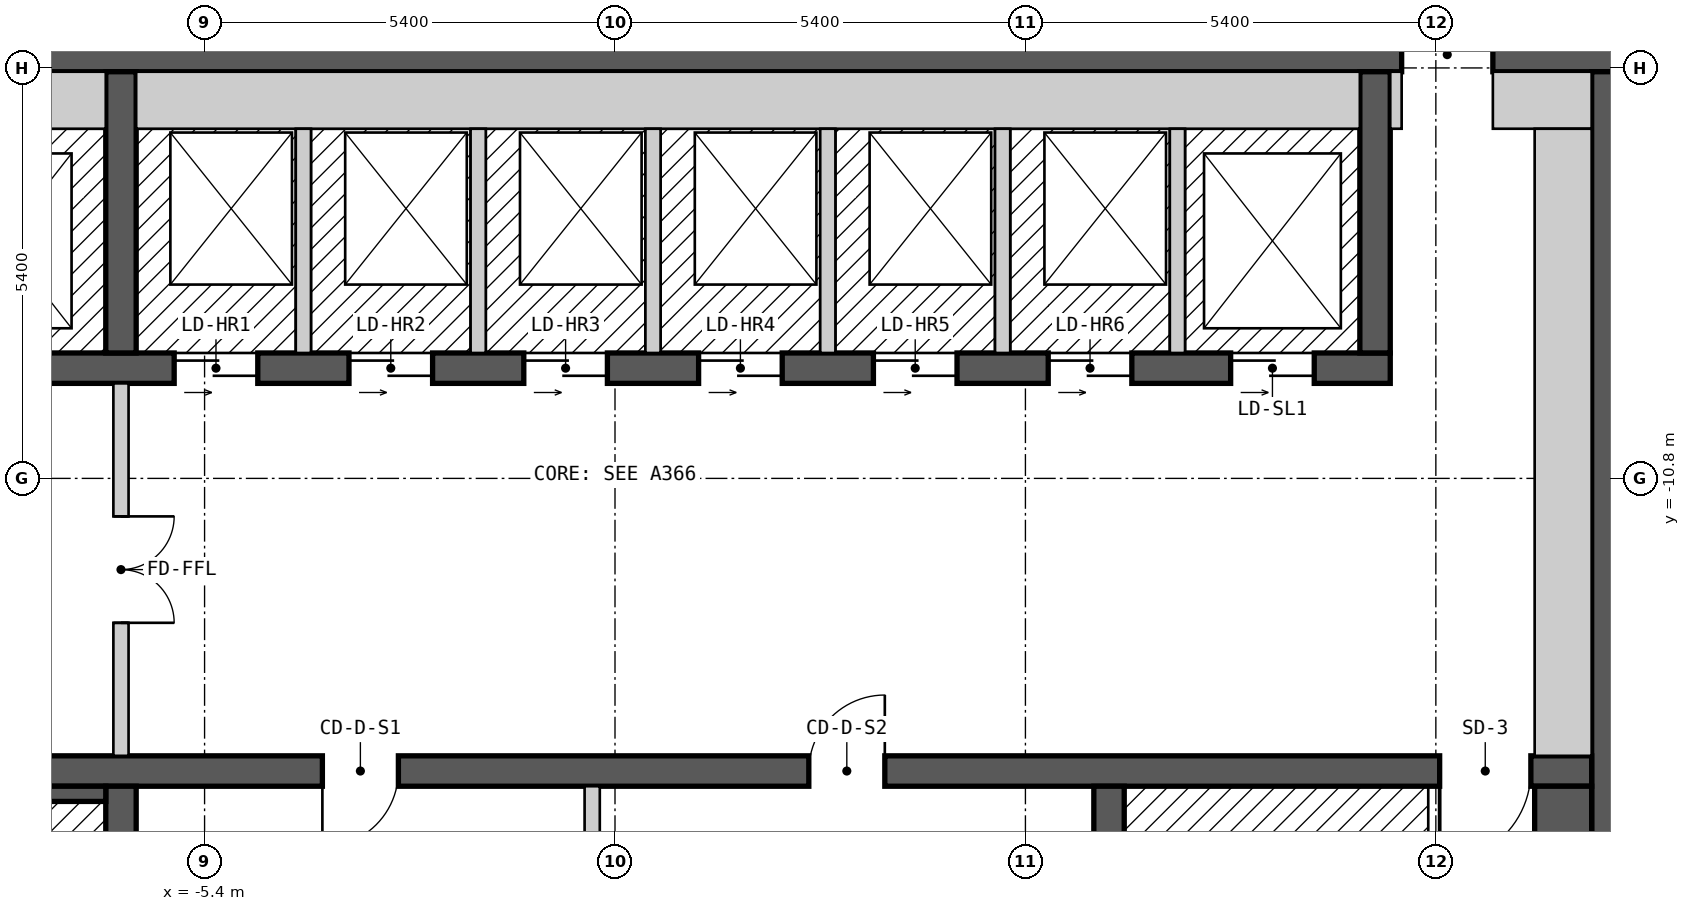
"""IFC4 building model, lengths in metres.
Left out: names, types, materials, properties, quantities, classifications, styles, units other than length and angle.
Written with IfcOpenShell. Run it as: python <this file> out.ifc"""

import sys

from ifc_helpers import new_model, si_unit, direction, frame, frame_2d, origin, place, context, subcontext, project, spatial, rectangle, extrude, element, fill, save


model = new_model("IFC4")
c1 = context("Model", 3, precision=1e-05, world=origin(), true_north=direction((0.0, 1.0)))
c2 = subcontext(c1, "Body", "Model", "MODEL_VIEW")
j1 = project(units=[si_unit("LENGTHUNIT", "METRE"), si_unit("PLANEANGLEUNIT", "RADIAN")], contexts=[c1])
p1 = place(None, origin())
s1 = spatial("IfcSite", under=j1, at=p1, CompositionType="ELEMENT")
p2 = place(p1, origin())
s2 = spatial("IfcBuilding", under=s1, at=p2, CompositionType="ELEMENT")
p3 = place(p2, frame((0.0, 0.0, 241.8)))
s3 = spatial("IfcBuildingStorey", under=s2, at=p3, CompositionType="ELEMENT", Elevation=241.8)
p4 = place(p3, frame((-13.3, -5.225, 0.0), z_axis=(0.0, 0.0, 1.0), x_axis=(1.0, 0.0, 0.0)))
e1 = element("IfcWall", 1, at=p4, inside=s3, PredefinedType="SHEAR", context=c2, shape_type="SweptSolid", body=[
    extrude(rectangle(XDim=26.6, YDim=0.45, at=frame_2d((13.3, 0.0))), origin(), (0.0, 0.0, 1.0), 2.2),
])
p5 = place(p4, frame((23.65, 0.0, 0.0)))
e2 = element("IfcOpeningElement", 2, at=p5, cuts=e1, PredefinedType="OPENING", context=c2, shape_type="SweptSolid", body=[
    extrude(rectangle(XDim=1.2, YDim=2.1, at=frame_2d((0.6, 1.05))), frame((0.0, 0.235, 0.0), z_axis=(0.0, -1.0, 0.0), x_axis=(1.0, 0.0, 0.0)), (0.0, 0.0, 1.0), 0.47),
])
p6 = place(p3, frame((13.075, -18.55, 0.0), z_axis=(0.0, 0.0, 1.0), x_axis=(0.0, 1.0, 0.0)))
e3 = element("IfcWall", 3, at=p6, inside=s3, PredefinedType="SHEAR", context=c2, shape_type="SweptSolid", body=[
    extrude(rectangle(XDim=13.1, YDim=0.45, at=frame_2d((6.55, 0.0))), origin(), (0.0, 0.0, 1.0), 2.2),
])
p7 = place(p3, frame((-12.85, -14.65, 0.0), z_axis=(0.0, 0.0, 1.0), x_axis=(1.0, 0.0, 0.0)))
e4 = element("IfcWall", 4, at=p7, inside=s3, PredefinedType="SHEAR", context=c2, shape_type="SweptSolid", body=[
    extrude(rectangle(XDim=25.7, YDim=0.4, at=frame_2d((12.85, 0.0))), origin(), (0.0, 0.0, 1.0), 2.2),
])
p8 = place(p7, frame((2.05, 0.0, 0.0), z_axis=(0.0, 0.0, 1.0), x_axis=(-1.0, 0.0, 0.0)))
e5 = element("IfcOpeningElement", 5, at=p8, cuts=e4, PredefinedType="OPENING", context=c2, shape_type="SweptSolid", body=[
    extrude(rectangle(XDim=1.2, YDim=2.1, at=frame_2d((0.6, 1.05))), frame((0.0, 0.21, 0.0), z_axis=(0.0, -1.0, 0.0), x_axis=(1.0, 0.0, 0.0)), (0.0, 0.0, 1.0), 0.42),
])
p9 = place(p7, frame((24.9, 0.0, 0.0), z_axis=(0.0, 0.0, 1.0), x_axis=(-1.0, 0.0, 0.0)))
e6 = element("IfcOpeningElement", 6, at=p9, cuts=e4, PredefinedType="OPENING", context=c2, shape_type="SweptSolid", body=[
    extrude(rectangle(XDim=1.2, YDim=2.1, at=frame_2d((0.6, 1.05))), frame((0.0, 0.21, 0.0), z_axis=(0.0, -1.0, 0.0), x_axis=(1.0, 0.0, 0.0)), (0.0, 0.0, 1.0), 0.42),
])
p10 = place(p7, frame((10.0, 0.0, 0.0), z_axis=(0.0, 0.0, 1.0), x_axis=(-1.0, 0.0, 0.0)))
e7 = element("IfcOpeningElement", 7, at=p10, cuts=e4, PredefinedType="OPENING", context=c2, shape_type="SweptSolid", body=[
    extrude(rectangle(XDim=1.0, YDim=2.1, at=frame_2d((0.5, 1.05))), frame((0.0, 0.21, 0.0), z_axis=(0.0, -1.0, 0.0), x_axis=(1.0, 0.0, 0.0)), (0.0, 0.0, 1.0), 0.42),
])
p11 = place(p7, frame((16.4, 0.0, 0.0), z_axis=(0.0, 0.0, 1.0), x_axis=(-1.0, 0.0, 0.0)))
e8 = element("IfcOpeningElement", 8, at=p11, cuts=e4, PredefinedType="OPENING", context=c2, shape_type="SweptSolid", body=[
    extrude(rectangle(XDim=1.0, YDim=2.1, at=frame_2d((0.5, 1.05))), frame((0.0, 0.21, 0.0), z_axis=(0.0, -1.0, 0.0), x_axis=(1.0, 0.0, 0.0)), (0.0, 0.0, 1.0), 0.42),
])
p12 = place(p3, frame((-12.85, -9.35, 0.0), z_axis=(0.0, 0.0, 1.0), x_axis=(1.0, 0.0, 0.0)))
e9 = element("IfcWall", 9, at=p12, inside=s3, PredefinedType="SHEAR", context=c2, shape_type="SweptSolid", body=[
    extrude(rectangle(XDim=23.05, YDim=0.4, at=frame_2d((11.525, 0.0))), origin(), (0.0, 0.0, 1.0), 2.2),
])
p13 = place(p12, frame((1.45, 0.0, 0.0)))
e10 = element("IfcOpeningElement", 10, at=p13, cuts=e9, PredefinedType="OPENING", context=c2, shape_type="SweptSolid", body=[
    extrude(rectangle(XDim=1.1, YDim=2.1, at=frame_2d((0.55, 1.05))), frame((0.0, 0.21, 0.0), z_axis=(0.0, -1.0, 0.0), x_axis=(1.0, 0.0, 0.0)), (0.0, 0.0, 1.0), 0.42),
])
p14 = place(p12, frame((4.25, 0.0, 0.0)))
e11 = element("IfcOpeningElement", 11, at=p14, cuts=e9, PredefinedType="OPENING", context=c2, shape_type="SweptSolid", body=[
    extrude(rectangle(XDim=1.1, YDim=2.1, at=frame_2d((0.55, 1.05))), frame((0.0, 0.21, 0.0), z_axis=(0.0, -1.0, 0.0), x_axis=(1.0, 0.0, 0.0)), (0.0, 0.0, 1.0), 0.42),
])
p15 = place(p12, frame((7.05, 0.0, 0.0)))
e12 = element("IfcOpeningElement", 12, at=p15, cuts=e9, PredefinedType="OPENING", context=c2, shape_type="SweptSolid", body=[
    extrude(rectangle(XDim=1.1, YDim=2.1, at=frame_2d((0.55, 1.05))), frame((0.0, 0.21, 0.0), z_axis=(0.0, -1.0, 0.0), x_axis=(1.0, 0.0, 0.0)), (0.0, 0.0, 1.0), 0.42),
])
p16 = place(p12, frame((9.35, 0.0, 0.0)))
e13 = element("IfcOpeningElement", 13, at=p16, cuts=e9, PredefinedType="OPENING", context=c2, shape_type="SweptSolid", body=[
    extrude(rectangle(XDim=1.1, YDim=2.1, at=frame_2d((0.55, 1.05))), frame((0.0, 0.21, 0.0), z_axis=(0.0, -1.0, 0.0), x_axis=(1.0, 0.0, 0.0)), (0.0, 0.0, 1.0), 0.42),
])
p17 = place(p12, frame((11.65, 0.0, 0.0)))
e14 = element("IfcOpeningElement", 14, at=p17, cuts=e9, PredefinedType="OPENING", context=c2, shape_type="SweptSolid", body=[
    extrude(rectangle(XDim=1.1, YDim=2.1, at=frame_2d((0.55, 1.05))), frame((0.0, 0.21, 0.0), z_axis=(0.0, -1.0, 0.0), x_axis=(1.0, 0.0, 0.0)), (0.0, 0.0, 1.0), 0.42),
])
p18 = place(p12, frame((13.95, 0.0, 0.0)))
e15 = element("IfcOpeningElement", 15, at=p18, cuts=e9, PredefinedType="OPENING", context=c2, shape_type="SweptSolid", body=[
    extrude(rectangle(XDim=1.1, YDim=2.1, at=frame_2d((0.55, 1.05))), frame((0.0, 0.21, 0.0), z_axis=(0.0, -1.0, 0.0), x_axis=(1.0, 0.0, 0.0)), (0.0, 0.0, 1.0), 0.42),
])
p19 = place(p12, frame((16.25, 0.0, 0.0)))
e16 = element("IfcOpeningElement", 16, at=p19, cuts=e9, PredefinedType="OPENING", context=c2, shape_type="SweptSolid", body=[
    extrude(rectangle(XDim=1.1, YDim=2.1, at=frame_2d((0.55, 1.05))), frame((0.0, 0.21, 0.0), z_axis=(0.0, -1.0, 0.0), x_axis=(1.0, 0.0, 0.0)), (0.0, 0.0, 1.0), 0.42),
])
p20 = place(p12, frame((18.55, 0.0, 0.0)))
e17 = element("IfcOpeningElement", 17, at=p20, cuts=e9, PredefinedType="OPENING", context=c2, shape_type="SweptSolid", body=[
    extrude(rectangle(XDim=1.1, YDim=2.1, at=frame_2d((0.55, 1.05))), frame((0.0, 0.21, 0.0), z_axis=(0.0, -1.0, 0.0), x_axis=(1.0, 0.0, 0.0)), (0.0, 0.0, 1.0), 0.42),
])
p21 = place(p12, frame((20.95, 0.0, 0.0)))
e18 = element("IfcOpeningElement", 18, at=p21, cuts=e9, PredefinedType="OPENING", context=c2, shape_type="SweptSolid", body=[
    extrude(rectangle(XDim=1.1, YDim=2.1, at=frame_2d((0.55, 1.05))), frame((0.0, 0.21, 0.0), z_axis=(0.0, -1.0, 0.0), x_axis=(1.0, 0.0, 0.0)), (0.0, 0.0, 1.0), 0.42),
])
for number, where, z_axis, x_axis in (
    (19, (-6.5, -18.55, 0.0), (0.0, 0.0, 1.0), (0.0, 1.0, 0.0)),
    (20, (6.5, -18.55, 0.0), (0.0, 0.0, 1.0), (0.0, 1.0, 0.0)),
    (21, (-6.5, -9.15, 0.0), (0.0, 0.0, 1.0), (0.0, 1.0, 0.0)),
    (22, (10.0, -9.15, 0.0), (0.0, 0.0, 1.0), (0.0, 1.0, 0.0)),
):
    element("IfcWall", number, at=place(p3, frame(where, z_axis=z_axis, x_axis=x_axis)), inside=s3, PredefinedType="SHEAR", context=c2, shape_type="SweptSolid", body=[
        extrude(rectangle(XDim=3.7, YDim=0.4, at=frame_2d((1.85, 0.0))), origin(), (0.0, 0.0, 1.0), 2.2),
    ])
p22 = place(p3, frame((-12.1, -5.825, 0.0), z_axis=(0.0, 0.0, 1.0), x_axis=(1.0, 0.0, 0.0)))
e23 = element("IfcWall", 23, at=p22, inside=s3, PredefinedType="SOLIDWALL", context=c2, shape_type="SweptSolid", body=[
    extrude(rectangle(XDim=5.4, YDim=0.75, at=frame_2d((2.7, 0.0))), origin(), (0.0, 0.0, 1.0), 2.2),
])
p23 = place(p3, frame((-10.8, -14.95, 0.0), z_axis=(0.0, 0.0, 1.0), x_axis=(1.0, 0.0, 0.0)))
e24 = element("IfcWall", 24, at=p23, inside=s3, PredefinedType="SOLIDWALL", context=c2, shape_type="SweptSolid", body=[
    extrude(rectangle(XDim=4.1, YDim=0.2, at=frame_2d((2.05, 0.0))), origin(), (0.0, 0.0, 1.0), 2.2),
])
p24 = place(p3, frame((-6.5, -14.45, 0.0), z_axis=(0.0, 0.0, 1.0), x_axis=(0.0, 1.0, 0.0)))
e25 = element("IfcWall", 25, at=p24, inside=s3, PredefinedType="PARTITIONING", context=c2, shape_type="SweptSolid", body=[
    extrude(rectangle(XDim=4.9, YDim=0.2, at=frame_2d((2.45, 0.0))), origin(), (0.0, 0.0, 1.0), 2.2),
])
p25 = place(p24, frame((3.15, 0.0, 0.0), z_axis=(0.0, 0.0, 1.0), x_axis=(-1.0, 0.0, 0.0)))
e26 = element("IfcOpeningElement", 26, at=p25, cuts=e25, PredefinedType="OPENING", context=c2, shape_type="SweptSolid", body=[
    extrude(rectangle(XDim=1.4, YDim=2.1, at=frame_2d((0.7, 1.05))), frame((0.0, 0.11, 0.0), z_axis=(0.0, -1.0, 0.0), x_axis=(1.0, 0.0, 0.0)), (0.0, 0.0, 1.0), 0.22),
])
p26 = place(p3, frame((-6.3, -5.825, 0.0), z_axis=(0.0, 0.0, 1.0), x_axis=(1.0, 0.0, 0.0)))
e27 = element("IfcWall", 27, at=p26, inside=s3, PredefinedType="SOLIDWALL", context=c2, shape_type="SweptSolid", body=[
    extrude(rectangle(XDim=16.1, YDim=0.75, at=frame_2d((8.05, 0.0))), origin(), (0.0, 0.0, 1.0), 2.2),
])
for number, where, z_axis, x_axis in (
    (28, (-4.1, -9.15, 0.0), (0.0, 0.0, 1.0), (0.0, 1.0, 0.0)),
    (29, (-1.8, -9.15, 0.0), (0.0, 0.0, 1.0), (0.0, 1.0, 0.0)),
):
    element("IfcWall", number, at=place(p3, frame(where, z_axis=z_axis, x_axis=x_axis)), inside=s3, PredefinedType="SOLIDWALL", context=c2, shape_type="SweptSolid", body=[
        extrude(rectangle(XDim=2.95, YDim=0.2, at=frame_2d((1.475, 0.0))), origin(), (0.0, 0.0, 1.0), 2.2),
    ])
p27 = place(p3, frame((-0.3, -17.8, 0.0), z_axis=(0.0, 0.0, 1.0), x_axis=(0.0, 1.0, 0.0)))
e30 = element("IfcWall", 30, at=p27, inside=s3, PredefinedType="PARTITIONING", context=c2, shape_type="SweptSolid", body=[
    extrude(rectangle(XDim=2.95, YDim=0.2, at=frame_2d((1.475, 0.0))), origin(), (0.0, 0.0, 1.0), 2.2),
])
for number, where, z_axis, x_axis in (
    (31, (0.5, -9.15, 0.0), (0.0, 0.0, 1.0), (0.0, 1.0, 0.0)),
    (32, (2.8, -9.15, 0.0), (0.0, 0.0, 1.0), (0.0, 1.0, 0.0)),
    (33, (5.1, -9.15, 0.0), (0.0, 0.0, 1.0), (0.0, 1.0, 0.0)),
    (34, (7.4, -9.15, 0.0), (0.0, 0.0, 1.0), (0.0, 1.0, 0.0)),
):
    element("IfcWall", number, at=place(p3, frame(where, z_axis=z_axis, x_axis=x_axis)), inside=s3, PredefinedType="SOLIDWALL", context=c2, shape_type="SweptSolid", body=[
        extrude(rectangle(XDim=2.95, YDim=0.2, at=frame_2d((1.475, 0.0))), origin(), (0.0, 0.0, 1.0), 2.2),
    ])
p28 = place(p3, frame((10.275, -6.2, 0.0), z_axis=(0.0, 0.0, 1.0), x_axis=(0.0, 1.0, 0.0)))
e35 = element("IfcWall", 35, at=p28, inside=s3, PredefinedType="PARTITIONING", context=c2, shape_type="SweptSolid", body=[
    extrude(rectangle(XDim=0.75, YDim=0.15, at=frame_2d((0.375, 0.0))), origin(), (0.0, 0.0, 1.0), 2.2),
])
p29 = place(p3, frame((11.55, -5.825, 0.0), z_axis=(0.0, 0.0, 1.0), x_axis=(1.0, 0.0, 0.0)))
e36 = element("IfcWall", 36, at=p29, inside=s3, PredefinedType="PARTITIONING", context=c2, shape_type="SweptSolid", body=[
    extrude(rectangle(XDim=1.3, YDim=0.75, at=frame_2d((0.65, 0.0))), origin(), (0.0, 0.0, 1.0), 2.2),
])
p30 = place(p3, frame((12.475, -17.6, 0.0), z_axis=(0.0, 0.0, 1.0), x_axis=(0.0, 1.0, 0.0)))
e37 = element("IfcWall", 37, at=p30, inside=s3, PredefinedType="SOLIDWALL", context=c2, shape_type="SweptSolid", body=[
    extrude(rectangle(XDim=2.75, YDim=0.75, at=frame_2d((1.375, 0.0))), origin(), (0.0, 0.0, 1.0), 2.2),
])
p31 = place(p3, frame((12.475, -14.45, 0.0), z_axis=(0.0, 0.0, 1.0), x_axis=(0.0, 1.0, 0.0)))
e38 = element("IfcWall", 38, at=p31, inside=s3, PredefinedType="PARTITIONING", context=c2, shape_type="SweptSolid", body=[
    extrude(rectangle(XDim=8.25, YDim=0.75, at=frame_2d((4.125, 0.0))), origin(), (0.0, 0.0, 1.0), 2.2),
])
p32 = place(p15, origin())
e39 = element("IfcDoor", 39, at=p32, inside=s3, OperationType="DOUBLE_DOOR_SLIDING", PredefinedType="DOOR", context=c2, shape_type="SweptSolid", body=[
    extrude(rectangle(XDim=1.1, YDim=2.1, at=frame_2d((0.55, 1.05))), frame((0.0, 0.025, 0.0), z_axis=(0.0, -1.0, 0.0), x_axis=(1.0, 0.0, 0.0)), (0.0, 0.0, 1.0), 0.05),
])
fill(e12, e39)
p33 = place(p16, origin())
e40 = element("IfcDoor", 40, at=p33, inside=s3, OperationType="DOUBLE_DOOR_SLIDING", PredefinedType="DOOR", context=c2, shape_type="SweptSolid", body=[
    extrude(rectangle(XDim=1.1, YDim=2.1, at=frame_2d((0.55, 1.05))), frame((0.0, 0.025, 0.0), z_axis=(0.0, -1.0, 0.0), x_axis=(1.0, 0.0, 0.0)), (0.0, 0.0, 1.0), 0.05),
])
fill(e13, e40)
p34 = place(p17, origin())
e41 = element("IfcDoor", 41, at=p34, inside=s3, OperationType="DOUBLE_DOOR_SLIDING", PredefinedType="DOOR", context=c2, shape_type="SweptSolid", body=[
    extrude(rectangle(XDim=1.1, YDim=2.1, at=frame_2d((0.55, 1.05))), frame((0.0, 0.025, 0.0), z_axis=(0.0, -1.0, 0.0), x_axis=(1.0, 0.0, 0.0)), (0.0, 0.0, 1.0), 0.05),
])
fill(e14, e41)
p35 = place(p18, origin())
e42 = element("IfcDoor", 42, at=p35, inside=s3, OperationType="DOUBLE_DOOR_SLIDING", PredefinedType="DOOR", context=c2, shape_type="SweptSolid", body=[
    extrude(rectangle(XDim=1.1, YDim=2.1, at=frame_2d((0.55, 1.05))), frame((0.0, 0.025, 0.0), z_axis=(0.0, -1.0, 0.0), x_axis=(1.0, 0.0, 0.0)), (0.0, 0.0, 1.0), 0.05),
])
fill(e15, e42)
p36 = place(p19, origin())
e43 = element("IfcDoor", 43, at=p36, inside=s3, OperationType="DOUBLE_DOOR_SLIDING", PredefinedType="DOOR", context=c2, shape_type="SweptSolid", body=[
    extrude(rectangle(XDim=1.1, YDim=2.1, at=frame_2d((0.55, 1.05))), frame((0.0, 0.025, 0.0), z_axis=(0.0, -1.0, 0.0), x_axis=(1.0, 0.0, 0.0)), (0.0, 0.0, 1.0), 0.05),
])
fill(e16, e43)
p37 = place(p20, origin())
e44 = element("IfcDoor", 44, at=p37, inside=s3, OperationType="DOUBLE_DOOR_SLIDING", PredefinedType="DOOR", context=c2, shape_type="SweptSolid", body=[
    extrude(rectangle(XDim=1.1, YDim=2.1, at=frame_2d((0.55, 1.05))), frame((0.0, 0.025, 0.0), z_axis=(0.0, -1.0, 0.0), x_axis=(1.0, 0.0, 0.0)), (0.0, 0.0, 1.0), 0.05),
])
fill(e17, e44)
p38 = place(p21, origin())
e45 = element("IfcDoor", 45, at=p38, inside=s3, OperationType="DOUBLE_DOOR_SLIDING", PredefinedType="DOOR", context=c2, shape_type="SweptSolid", body=[
    extrude(rectangle(XDim=1.1, YDim=2.1, at=frame_2d((0.55, 1.05))), frame((0.0, 0.025, 0.0), z_axis=(0.0, -1.0, 0.0), x_axis=(1.0, 0.0, 0.0)), (0.0, 0.0, 1.0), 0.05),
])
fill(e18, e45)
p39 = place(p9, origin())
e46 = element("IfcDoor", 46, at=p39, inside=s3, OperationType="SINGLE_SWING_RIGHT", PredefinedType="DOOR", context=c2, shape_type="SweptSolid", body=[
    extrude(rectangle(XDim=1.2, YDim=2.1, at=frame_2d((0.6, 1.05))), frame((0.0, 0.025, 0.0), z_axis=(0.0, -1.0, 0.0), x_axis=(1.0, 0.0, 0.0)), (0.0, 0.0, 1.0), 0.05),
])
fill(e6, e46)
p40 = place(p25, origin())
e47 = element("IfcDoor", 47, at=p40, inside=s3, OperationType="DOUBLE_DOOR_SINGLE_SWING", PredefinedType="DOOR", context=c2, shape_type="SweptSolid", body=[
    extrude(rectangle(XDim=1.4, YDim=2.1, at=frame_2d((0.7, 1.05))), frame((0.0, 0.025, 0.0), z_axis=(0.0, -1.0, 0.0), x_axis=(1.0, 0.0, 0.0)), (0.0, 0.0, 1.0), 0.05),
])
fill(e26, e47)
p41 = place(p5, origin())
e48 = element("IfcDoor", 48, at=p41, inside=s3, OperationType="DOUBLE_DOOR_SINGLE_SWING", PredefinedType="DOOR", context=c2, shape_type="SweptSolid", body=[
    extrude(rectangle(XDim=1.2, YDim=2.1, at=frame_2d((0.6, 1.05))), frame((0.0, 0.025, 0.0), z_axis=(0.0, -1.0, 0.0), x_axis=(1.0, 0.0, 0.0)), (0.0, 0.0, 1.0), 0.05),
])
fill(e2, e48)
p42 = place(p10, origin())
e49 = element("IfcDoor", 49, at=p42, inside=s3, OperationType="SINGLE_SWING_RIGHT", PredefinedType="DOOR", context=c2, shape_type="SweptSolid", body=[
    extrude(rectangle(XDim=1.0, YDim=2.1, at=frame_2d((0.5, 1.05))), frame((0.0, 0.025, 0.0), z_axis=(0.0, -1.0, 0.0), x_axis=(1.0, 0.0, 0.0)), (0.0, 0.0, 1.0), 0.05),
])
fill(e7, e49)
p43 = place(p11, origin())
e50 = element("IfcDoor", 50, at=p43, inside=s3, OperationType="SINGLE_SWING_LEFT", PredefinedType="DOOR", context=c2, shape_type="SweptSolid", body=[
    extrude(rectangle(XDim=1.0, YDim=2.1, at=frame_2d((0.5, 1.05))), frame((0.0, 0.025, 0.0), z_axis=(0.0, -1.0, 0.0), x_axis=(1.0, 0.0, 0.0)), (0.0, 0.0, 1.0), 0.05),
])
fill(e8, e50)
save(model, sys.argv[1])
